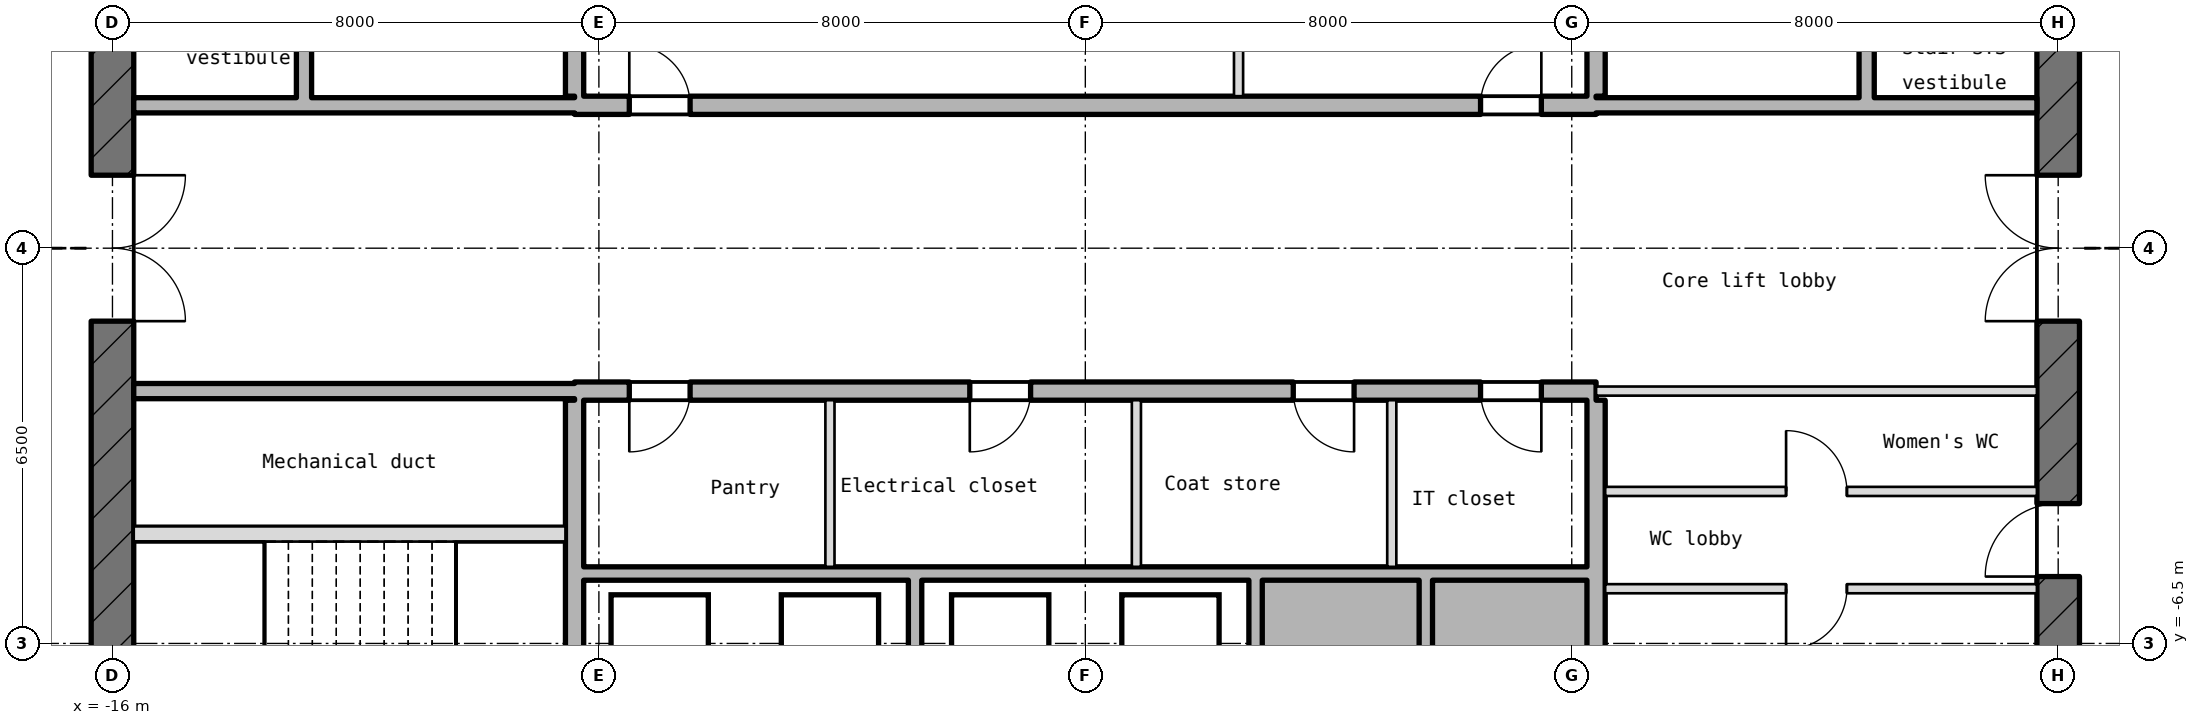
"""IFC4 building model, lengths in metres.
Left out: names, types, materials, properties, quantities, classifications, styles, units other than length and angle.
Written with IfcOpenShell. Run it as: python <this file> out.ifc"""

import sys

from ifc_helpers import new_model, si_unit, direction, frame, frame_2d, origin, place, context, subcontext, project, spatial, rectangle, extrude, element, fill, save


model = new_model("IFC4")
c1 = context("Model", 3, precision=1e-05, world=origin(), true_north=direction((0.0, 1.0)))
c2 = subcontext(c1, "Body", "Model", "MODEL_VIEW")
j1 = project(units=[si_unit("LENGTHUNIT", "METRE"), si_unit("PLANEANGLEUNIT", "RADIAN")], contexts=[c1])
p1 = place(None, origin())
s1 = spatial("IfcSite", under=j1, at=p1, CompositionType="ELEMENT")
p2 = place(p1, origin())
s2 = spatial("IfcBuilding", under=s1, at=p2, CompositionType="ELEMENT")
p3 = place(p2, frame((0.0, 0.0, 407.55)))
s3 = spatial("IfcBuildingStorey", under=s2, at=p3, CompositionType="ELEMENT", Elevation=407.55)
p4 = place(p3, frame((16.0, -10.145, -0.3), z_axis=(0.0, 0.0, 1.0), x_axis=(0.0, 1.0, 0.0)))
e1 = element("IfcWall", 1, at=p4, inside=s3, PredefinedType="SHEAR", context=c2, shape_type="SweptSolid", body=[
    extrude(rectangle(XDim=20.29, YDim=0.7, at=frame_2d((10.145, 0.0))), origin(), (0.0, 0.0, 1.0), 6.1),
])
p5 = place(p4, frame((8.945, 0.0, 0.3)))
e2 = element("IfcOpeningElement", 2, at=p5, cuts=e1, PredefinedType="OPENING", context=c2, shape_type="SweptSolid", body=[
    extrude(rectangle(XDim=2.4, YDim=2.1, at=frame_2d((1.2, 1.05))), frame((0.0, 0.36, 0.0), z_axis=(0.0, -1.0, 0.0), x_axis=(1.0, 0.0, 0.0)), (0.0, 0.0, 1.0), 0.72),
])
p6 = place(p4, frame((13.545, 0.0, 0.3)))
e3 = element("IfcOpeningElement", 3, at=p6, cuts=e1, PredefinedType="OPENING", context=c2, shape_type="SweptSolid", body=[
    extrude(rectangle(XDim=1.2, YDim=2.1, at=frame_2d((0.6, 1.05))), frame((0.0, 0.36, 0.0), z_axis=(0.0, -1.0, 0.0), x_axis=(1.0, 0.0, 0.0)), (0.0, 0.0, 1.0), 0.72),
])
p7 = place(p4, frame((4.745, 0.0, 0.3)))
e4 = element("IfcOpeningElement", 4, at=p7, cuts=e1, PredefinedType="OPENING", context=c2, shape_type="SweptSolid", body=[
    extrude(rectangle(XDim=1.2, YDim=2.1, at=frame_2d((0.6, 1.05))), frame((0.0, 0.36, 0.0), z_axis=(0.0, -1.0, 0.0), x_axis=(1.0, 0.0, 0.0)), (0.0, 0.0, 1.0), 0.72),
])
p8 = place(p3, frame((-16.0, 10.145, -0.3), z_axis=(0.0, 0.0, 1.0), x_axis=(0.0, -1.0, 0.0)))
e5 = element("IfcWall", 5, at=p8, inside=s3, PredefinedType="SHEAR", context=c2, shape_type="SweptSolid", body=[
    extrude(rectangle(XDim=20.29, YDim=0.7, at=frame_2d((10.145, 0.0))), origin(), (0.0, 0.0, 1.0), 6.1),
])
p9 = place(p8, frame((8.945, 0.0, 0.3)))
e6 = element("IfcOpeningElement", 6, at=p9, cuts=e5, PredefinedType="OPENING", context=c2, shape_type="SweptSolid", body=[
    extrude(rectangle(XDim=2.4, YDim=2.1, at=frame_2d((1.2, 1.05))), frame((0.0, 0.36, 0.0), z_axis=(0.0, -1.0, 0.0), x_axis=(1.0, 0.0, 0.0)), (0.0, 0.0, 1.0), 0.72),
])
p10 = place(p8, frame((5.545, 0.0, 0.3)))
e7 = element("IfcOpeningElement", 7, at=p10, cuts=e5, PredefinedType="OPENING", context=c2, shape_type="SweptSolid", body=[
    extrude(rectangle(XDim=1.2, YDim=2.1, at=frame_2d((0.6, 1.05))), frame((0.0, 0.36, 0.0), z_axis=(0.0, -1.0, 0.0), x_axis=(1.0, 0.0, 0.0)), (0.0, 0.0, 1.0), 0.72),
])
p11 = place(p3, frame((8.55, -5.6, 0.0), z_axis=(0.0, 0.0, 1.0), x_axis=(1.0, 0.0, 0.0)))
e8 = element("IfcWall", 8, at=p11, inside=s3, PredefinedType="PARTITIONING", context=c2, shape_type="SweptSolid", body=[
    extrude(rectangle(XDim=7.1, YDim=0.15, at=frame_2d((3.55, 0.0))), origin(), (0.0, 0.0, 1.0), 5.8),
])
p12 = place(p11, frame((2.975, 0.0, 0.0)))
e9 = element("IfcOpeningElement", 9, at=p12, cuts=e8, PredefinedType="OPENING", context=c2, shape_type="SweptSolid", body=[
    extrude(rectangle(XDim=1.0, YDim=2.1, at=frame_2d((0.5, 1.05))), frame((0.0, 0.085, 0.0), z_axis=(0.0, -1.0, 0.0), x_axis=(1.0, 0.0, 0.0)), (0.0, 0.0, 1.0), 0.17),
])
p13 = place(p3, frame((-8.25, -5.35, 0.0), z_axis=(0.0, 0.0, 1.0), x_axis=(1.0, 0.0, 0.0)))
e10 = element("IfcWall", 10, at=p13, inside=s3, PredefinedType="STANDARD", context=c2, shape_type="SweptSolid", body=[
    extrude(rectangle(XDim=16.5, YDim=0.22, at=frame_2d((8.25, 0.0))), origin(), (0.0, 0.0, 1.0), 5.8),
])
p14 = place(p3, frame((-15.65, -4.7, -0.3), z_axis=(0.0, 0.0, 1.0), x_axis=(1.0, 0.0, 0.0)))
e11 = element("IfcWall", 11, at=p14, inside=s3, PredefinedType="SHEAR", context=c2, shape_type="SweptSolid", body=[
    extrude(rectangle(XDim=7.1, YDim=0.25, at=frame_2d((3.55, 0.0))), origin(), (0.0, 0.0, 1.0), 6.1),
])
p15 = place(p3, frame((8.55, -4.0, 0.0), z_axis=(0.0, 0.0, 1.0), x_axis=(1.0, 0.0, 0.0)))
e12 = element("IfcWall", 12, at=p15, inside=s3, PredefinedType="PARTITIONING", context=c2, shape_type="SweptSolid", body=[
    extrude(rectangle(XDim=7.1, YDim=0.15, at=frame_2d((3.55, 0.0))), origin(), (0.0, 0.0, 1.0), 5.8),
])
p16 = place(p15, frame((2.975, 0.0, 0.0)))
e13 = element("IfcOpeningElement", 13, at=p16, cuts=e12, PredefinedType="OPENING", context=c2, shape_type="SweptSolid", body=[
    extrude(rectangle(XDim=1.0, YDim=2.1, at=frame_2d((0.5, 1.05))), frame((0.0, 0.085, 0.0), z_axis=(0.0, -1.0, 0.0), x_axis=(1.0, 0.0, 0.0)), (0.0, 0.0, 1.0), 0.17),
])
p17 = place(p3, frame((-15.65, -2.35, 0.0), z_axis=(0.0, 0.0, 1.0), x_axis=(1.0, 0.0, 0.0)))
e14 = element("IfcWall", 14, at=p17, inside=s3, PredefinedType="STANDARD", context=c2, shape_type="SweptSolid", body=[
    extrude(rectangle(XDim=7.25, YDim=0.25, at=frame_2d((3.625, 0.0))), origin(), (0.0, 0.0, 1.0), 5.8),
])
p18 = place(p3, frame((-8.4, -2.35, -0.3), z_axis=(0.0, 0.0, 1.0), x_axis=(1.0, 0.0, 0.0)))
e15 = element("IfcWall", 15, at=p18, inside=s3, PredefinedType="SHEAR", context=c2, shape_type="SweptSolid", body=[
    extrude(rectangle(XDim=16.8, YDim=0.3, at=frame_2d((8.4, 0.0))), origin(), (0.0, 0.0, 1.0), 6.1),
])
p19 = place(p18, frame((0.9, 0.0, 0.3)))
e16 = element("IfcOpeningElement", 16, at=p19, cuts=e15, PredefinedType="OPENING", context=c2, shape_type="SweptSolid", body=[
    extrude(rectangle(XDim=1.0, YDim=2.1, at=frame_2d((0.5, 1.05))), frame((0.0, 0.16, 0.0), z_axis=(0.0, -1.0, 0.0), x_axis=(1.0, 0.0, 0.0)), (0.0, 0.0, 1.0), 0.32),
])
p20 = place(p18, frame((6.5, 0.0, 0.3)))
e17 = element("IfcOpeningElement", 17, at=p20, cuts=e15, PredefinedType="OPENING", context=c2, shape_type="SweptSolid", body=[
    extrude(rectangle(XDim=1.0, YDim=2.1, at=frame_2d((0.5, 1.05))), frame((0.0, 0.16, 0.0), z_axis=(0.0, -1.0, 0.0), x_axis=(1.0, 0.0, 0.0)), (0.0, 0.0, 1.0), 0.32),
])
p21 = place(p18, frame((11.82, 0.0, 0.3)))
e18 = element("IfcOpeningElement", 18, at=p21, cuts=e15, PredefinedType="OPENING", context=c2, shape_type="SweptSolid", body=[
    extrude(rectangle(XDim=1.0, YDim=2.1, at=frame_2d((0.5, 1.05))), frame((0.0, 0.16, 0.0), z_axis=(0.0, -1.0, 0.0), x_axis=(1.0, 0.0, 0.0)), (0.0, 0.0, 1.0), 0.32),
])
p22 = place(p18, frame((14.9, 0.0, 0.3)))
e19 = element("IfcOpeningElement", 19, at=p22, cuts=e15, PredefinedType="OPENING", context=c2, shape_type="SweptSolid", body=[
    extrude(rectangle(XDim=1.0, YDim=2.1, at=frame_2d((0.5, 1.05))), frame((0.0, 0.16, 0.0), z_axis=(0.0, -1.0, 0.0), x_axis=(1.0, 0.0, 0.0)), (0.0, 0.0, 1.0), 0.32),
])
p23 = place(p3, frame((8.4, -2.35, 0.0), z_axis=(0.0, 0.0, 1.0), x_axis=(1.0, 0.0, 0.0)))
e20 = element("IfcWall", 20, at=p23, inside=s3, PredefinedType="PARTITIONING", context=c2, shape_type="SweptSolid", body=[
    extrude(rectangle(XDim=7.25, YDim=0.15, at=frame_2d((3.625, 0.0))), origin(), (0.0, 0.0, 1.0), 5.8),
])
p24 = place(p3, frame((-15.65, 2.35, 0.0), z_axis=(0.0, 0.0, 1.0), x_axis=(1.0, 0.0, 0.0)))
e21 = element("IfcWall", 21, at=p24, inside=s3, PredefinedType="STANDARD", context=c2, shape_type="SweptSolid", body=[
    extrude(rectangle(XDim=7.25, YDim=0.25, at=frame_2d((3.625, 0.0))), origin(), (0.0, 0.0, 1.0), 5.8),
])
p25 = place(p3, frame((-8.4, 2.35, -0.3), z_axis=(0.0, 0.0, 1.0), x_axis=(1.0, 0.0, 0.0)))
e22 = element("IfcWall", 22, at=p25, inside=s3, PredefinedType="SHEAR", context=c2, shape_type="SweptSolid", body=[
    extrude(rectangle(XDim=16.8, YDim=0.3, at=frame_2d((8.4, 0.0))), origin(), (0.0, 0.0, 1.0), 6.1),
])
p26 = place(p25, frame((0.9, 0.0, 0.3)))
e23 = element("IfcOpeningElement", 23, at=p26, cuts=e22, PredefinedType="OPENING", context=c2, shape_type="SweptSolid", body=[
    extrude(rectangle(XDim=1.0, YDim=2.1, at=frame_2d((0.5, 1.05))), frame((0.0, 0.16, 0.0), z_axis=(0.0, -1.0, 0.0), x_axis=(1.0, 0.0, 0.0)), (0.0, 0.0, 1.0), 0.32),
])
p27 = place(p25, frame((14.9, 0.0, 0.3)))
e24 = element("IfcOpeningElement", 24, at=p27, cuts=e22, PredefinedType="OPENING", context=c2, shape_type="SweptSolid", body=[
    extrude(rectangle(XDim=1.0, YDim=2.1, at=frame_2d((0.5, 1.05))), frame((0.0, 0.16, 0.0), z_axis=(0.0, -1.0, 0.0), x_axis=(1.0, 0.0, 0.0)), (0.0, 0.0, 1.0), 0.32),
])
p28 = place(p3, frame((8.4, 2.35, 0.0), z_axis=(0.0, 0.0, 1.0), x_axis=(1.0, 0.0, 0.0)))
e25 = element("IfcWall", 25, at=p28, inside=s3, PredefinedType="STANDARD", context=c2, shape_type="SweptSolid", body=[
    extrude(rectangle(XDim=7.25, YDim=0.25, at=frame_2d((3.625, 0.0))), origin(), (0.0, 0.0, 1.0), 5.8),
])
p29 = place(p3, frame((-12.85, 2.475, 0.0), z_axis=(0.0, 0.0, 1.0), x_axis=(0.0, 1.0, 0.0)))
e26 = element("IfcWall", 26, at=p29, inside=s3, PredefinedType="STANDARD", context=c2, shape_type="SweptSolid", body=[
    extrude(rectangle(XDim=3.05, YDim=0.25, at=frame_2d((1.525, 0.0))), origin(), (0.0, 0.0, 1.0), 5.8),
])
p30 = place(p3, frame((-8.4, -8.75, -0.3), z_axis=(0.0, 0.0, 1.0), x_axis=(0.0, 1.0, 0.0)))
e27 = element("IfcWall", 27, at=p30, inside=s3, PredefinedType="SHEAR", context=c2, shape_type="SweptSolid", body=[
    extrude(rectangle(XDim=6.25, YDim=0.3, at=frame_2d((3.125, 0.0))), origin(), (0.0, 0.0, 1.0), 6.1),
])
p31 = place(p3, frame((-8.4, 2.5, -0.3), z_axis=(0.0, 0.0, 1.0), x_axis=(0.0, 1.0, 0.0)))
e28 = element("IfcWall", 28, at=p31, inside=s3, PredefinedType="SHEAR", context=c2, shape_type="SweptSolid", body=[
    extrude(rectangle(XDim=5.85, YDim=0.3, at=frame_2d((2.925, 0.0))), origin(), (0.0, 0.0, 1.0), 6.1),
])
p32 = place(p3, frame((-4.2, -5.24, 0.0), z_axis=(0.0, 0.0, 1.0), x_axis=(0.0, 1.0, 0.0)))
e29 = element("IfcWall", 29, at=p32, inside=s3, PredefinedType="PARTITIONING", context=c2, shape_type="SweptSolid", body=[
    extrude(rectangle(XDim=2.74, YDim=0.15, at=frame_2d((1.37, 0.0))), origin(), (0.0, 0.0, 1.0), 5.8),
])
p33 = place(p3, frame((-2.8, -8.35, 0.0), z_axis=(0.0, 0.0, 1.0), x_axis=(0.0, 1.0, 0.0)))
e30 = element("IfcWall", 30, at=p33, inside=s3, PredefinedType="STANDARD", context=c2, shape_type="SweptSolid", body=[
    extrude(rectangle(XDim=2.89, YDim=0.22, at=frame_2d((1.445, 0.0))), origin(), (0.0, 0.0, 1.0), 5.8),
])
p34 = place(p3, frame((0.84, -5.24, 0.0), z_axis=(0.0, 0.0, 1.0), x_axis=(0.0, 1.0, 0.0)))
e31 = element("IfcWall", 31, at=p34, inside=s3, PredefinedType="PARTITIONING", context=c2, shape_type="SweptSolid", body=[
    extrude(rectangle(XDim=2.74, YDim=0.15, at=frame_2d((1.37, 0.0))), origin(), (0.0, 0.0, 1.0), 5.8),
])
p35 = place(p3, frame((2.52, 2.5, 0.0), z_axis=(0.0, 0.0, 1.0), x_axis=(0.0, 1.0, 0.0)))
e32 = element("IfcWall", 32, at=p35, inside=s3, PredefinedType="PARTITIONING", context=c2, shape_type="SweptSolid", body=[
    extrude(rectangle(XDim=2.775, YDim=0.15, at=frame_2d((1.387, 0.0))), origin(), (0.0, 0.0, 1.0), 5.8),
])
p36 = place(p3, frame((2.8, -8.24, 0.0), z_axis=(0.0, 0.0, 1.0), x_axis=(0.0, 1.0, 0.0)))
e33 = element("IfcWall", 33, at=p36, inside=s3, PredefinedType="STANDARD", context=c2, shape_type="SweptSolid", body=[
    extrude(rectangle(XDim=2.78, YDim=0.22, at=frame_2d((1.39, 0.0))), origin(), (0.0, 0.0, 1.0), 5.8),
])
p37 = place(p3, frame((5.04, -5.24, 0.0), z_axis=(0.0, 0.0, 1.0), x_axis=(0.0, 1.0, 0.0)))
e34 = element("IfcWall", 34, at=p37, inside=s3, PredefinedType="PARTITIONING", context=c2, shape_type="SweptSolid", body=[
    extrude(rectangle(XDim=2.74, YDim=0.15, at=frame_2d((1.37, 0.0))), origin(), (0.0, 0.0, 1.0), 5.8),
])
p38 = place(p3, frame((5.6, -8.24, 0.0), z_axis=(0.0, 0.0, 1.0), x_axis=(0.0, 1.0, 0.0)))
e35 = element("IfcWall", 35, at=p38, inside=s3, PredefinedType="STANDARD", context=c2, shape_type="SweptSolid", body=[
    extrude(rectangle(XDim=2.78, YDim=0.22, at=frame_2d((1.39, 0.0))), origin(), (0.0, 0.0, 1.0), 5.8),
])
for number, where, z_axis, x_axis in (
    (36, (8.4, -8.35, -0.3), (0.0, 0.0, 1.0), (0.0, 1.0, 0.0)),
    (37, (8.4, 2.5, -0.3), (0.0, 0.0, 1.0), (0.0, 1.0, 0.0)),
):
    element("IfcWall", number, at=place(p3, frame(where, z_axis=z_axis, x_axis=x_axis)), inside=s3, PredefinedType="SHEAR", context=c2, shape_type="SweptSolid", body=[
        extrude(rectangle(XDim=5.85, YDim=0.3, at=frame_2d((2.925, 0.0))), origin(), (0.0, 0.0, 1.0), 6.1),
    ])
p39 = place(p3, frame((12.85, 2.475, 0.0), z_axis=(0.0, 0.0, 1.0), x_axis=(0.0, 1.0, 0.0)))
e38 = element("IfcWall", 38, at=p39, inside=s3, PredefinedType="STANDARD", context=c2, shape_type="SweptSolid", body=[
    extrude(rectangle(XDim=3.05, YDim=0.25, at=frame_2d((1.525, 0.0))), origin(), (0.0, 0.0, 1.0), 5.8),
])
p40 = place(p9, origin())
e39 = element("IfcDoor", 39, at=p40, inside=s3, OperationType="DOUBLE_DOOR_SINGLE_SWING", PredefinedType="DOOR", context=c2, shape_type="SweptSolid", body=[
    extrude(rectangle(XDim=2.4, YDim=2.1, at=frame_2d((1.2, 1.05))), frame((0.0, 0.025, 0.0), z_axis=(0.0, -1.0, 0.0), x_axis=(1.0, 0.0, 0.0)), (0.0, 0.0, 1.0), 0.05),
])
fill(e6, e39)
p41 = place(p5, origin())
e40 = element("IfcDoor", 40, at=p41, inside=s3, OperationType="DOUBLE_DOOR_SINGLE_SWING", PredefinedType="DOOR", context=c2, shape_type="SweptSolid", body=[
    extrude(rectangle(XDim=2.4, YDim=2.1, at=frame_2d((1.2, 1.05))), frame((0.0, 0.025, 0.0), z_axis=(0.0, -1.0, 0.0), x_axis=(1.0, 0.0, 0.0)), (0.0, 0.0, 1.0), 0.05),
])
fill(e2, e40)
p42 = place(p26, origin())
e41 = element("IfcDoor", 41, at=p42, inside=s3, OperationType="SINGLE_SWING_RIGHT", PredefinedType="DOOR", context=c2, shape_type="SweptSolid", body=[
    extrude(rectangle(XDim=1.0, YDim=2.1, at=frame_2d((0.5, 1.05))), frame((0.0, 0.025, 0.0), z_axis=(0.0, -1.0, 0.0), x_axis=(1.0, 0.0, 0.0)), (0.0, 0.0, 1.0), 0.05),
])
fill(e23, e41)
p43 = place(p27, origin())
e42 = element("IfcDoor", 42, at=p43, inside=s3, OperationType="SINGLE_SWING_RIGHT", PredefinedType="DOOR", context=c2, shape_type="SweptSolid", body=[
    extrude(rectangle(XDim=1.0, YDim=2.1, at=frame_2d((0.5, 1.05))), frame((0.0, 0.025, 0.0), z_axis=(0.0, -1.0, 0.0), x_axis=(1.0, 0.0, 0.0)), (0.0, 0.0, 1.0), 0.05),
])
fill(e24, e42)
p44 = place(p19, frame((1.0, 0.0, 0.0), z_axis=(0.0, 0.0, 1.0), x_axis=(-1.0, 0.0, 0.0)))
e43 = element("IfcDoor", 43, at=p44, inside=s3, OperationType="SINGLE_SWING_LEFT", PredefinedType="DOOR", context=c2, shape_type="SweptSolid", body=[
    extrude(rectangle(XDim=1.0, YDim=2.1, at=frame_2d((0.5, 1.05))), frame((0.0, 0.025, 0.0), z_axis=(0.0, -1.0, 0.0), x_axis=(1.0, 0.0, 0.0)), (0.0, 0.0, 1.0), 0.05),
])
fill(e16, e43)
p45 = place(p20, frame((1.0, 0.0, 0.0), z_axis=(0.0, 0.0, 1.0), x_axis=(-1.0, 0.0, 0.0)))
e44 = element("IfcDoor", 44, at=p45, inside=s3, OperationType="SINGLE_SWING_LEFT", PredefinedType="DOOR", context=c2, shape_type="SweptSolid", body=[
    extrude(rectangle(XDim=1.0, YDim=2.1, at=frame_2d((0.5, 1.05))), frame((0.0, 0.025, 0.0), z_axis=(0.0, -1.0, 0.0), x_axis=(1.0, 0.0, 0.0)), (0.0, 0.0, 1.0), 0.05),
])
fill(e17, e44)
p46 = place(p21, frame((1.0, 0.0, 0.0), z_axis=(0.0, 0.0, 1.0), x_axis=(-1.0, 0.0, 0.0)))
e45 = element("IfcDoor", 45, at=p46, inside=s3, OperationType="SINGLE_SWING_LEFT", PredefinedType="DOOR", context=c2, shape_type="SweptSolid", body=[
    extrude(rectangle(XDim=1.0, YDim=2.1, at=frame_2d((0.5, 1.05))), frame((0.0, 0.025, 0.0), z_axis=(0.0, -1.0, 0.0), x_axis=(1.0, 0.0, 0.0)), (0.0, 0.0, 1.0), 0.05),
])
fill(e18, e45)
p47 = place(p22, frame((1.0, 0.0, 0.0), z_axis=(0.0, 0.0, 1.0), x_axis=(-1.0, 0.0, 0.0)))
e46 = element("IfcDoor", 46, at=p47, inside=s3, OperationType="SINGLE_SWING_LEFT", PredefinedType="DOOR", context=c2, shape_type="SweptSolid", body=[
    extrude(rectangle(XDim=1.0, YDim=2.1, at=frame_2d((0.5, 1.05))), frame((0.0, 0.025, 0.0), z_axis=(0.0, -1.0, 0.0), x_axis=(1.0, 0.0, 0.0)), (0.0, 0.0, 1.0), 0.05),
])
fill(e19, e46)
p48 = place(p16, origin())
e47 = element("IfcDoor", 47, at=p48, inside=s3, OperationType="SINGLE_SWING_RIGHT", PredefinedType="DOOR", context=c2, shape_type="SweptSolid", body=[
    extrude(rectangle(XDim=1.0, YDim=2.1, at=frame_2d((0.5, 1.05))), frame((0.0, 0.025, 0.0), z_axis=(0.0, -1.0, 0.0), x_axis=(1.0, 0.0, 0.0)), (0.0, 0.0, 1.0), 0.05),
])
fill(e13, e47)
p49 = place(p7, origin())
e48 = element("IfcDoor", 48, at=p49, inside=s3, OperationType="SINGLE_SWING_RIGHT", PredefinedType="DOOR", context=c2, shape_type="SweptSolid", body=[
    extrude(rectangle(XDim=1.2, YDim=2.1, at=frame_2d((0.6, 1.05))), frame((0.0, 0.025, 0.0), z_axis=(0.0, -1.0, 0.0), x_axis=(1.0, 0.0, 0.0)), (0.0, 0.0, 1.0), 0.05),
])
fill(e4, e48)
p50 = place(p12, frame((1.0, 0.0, 0.0), z_axis=(0.0, 0.0, 1.0), x_axis=(-1.0, 0.0, 0.0)))
e49 = element("IfcDoor", 49, at=p50, inside=s3, OperationType="SINGLE_SWING_LEFT", PredefinedType="DOOR", context=c2, shape_type="SweptSolid", body=[
    extrude(rectangle(XDim=1.0, YDim=2.1, at=frame_2d((0.5, 1.05))), frame((0.0, 0.025, 0.0), z_axis=(0.0, -1.0, 0.0), x_axis=(1.0, 0.0, 0.0)), (0.0, 0.0, 1.0), 0.05),
])
fill(e9, e49)
save(model, sys.argv[1])
